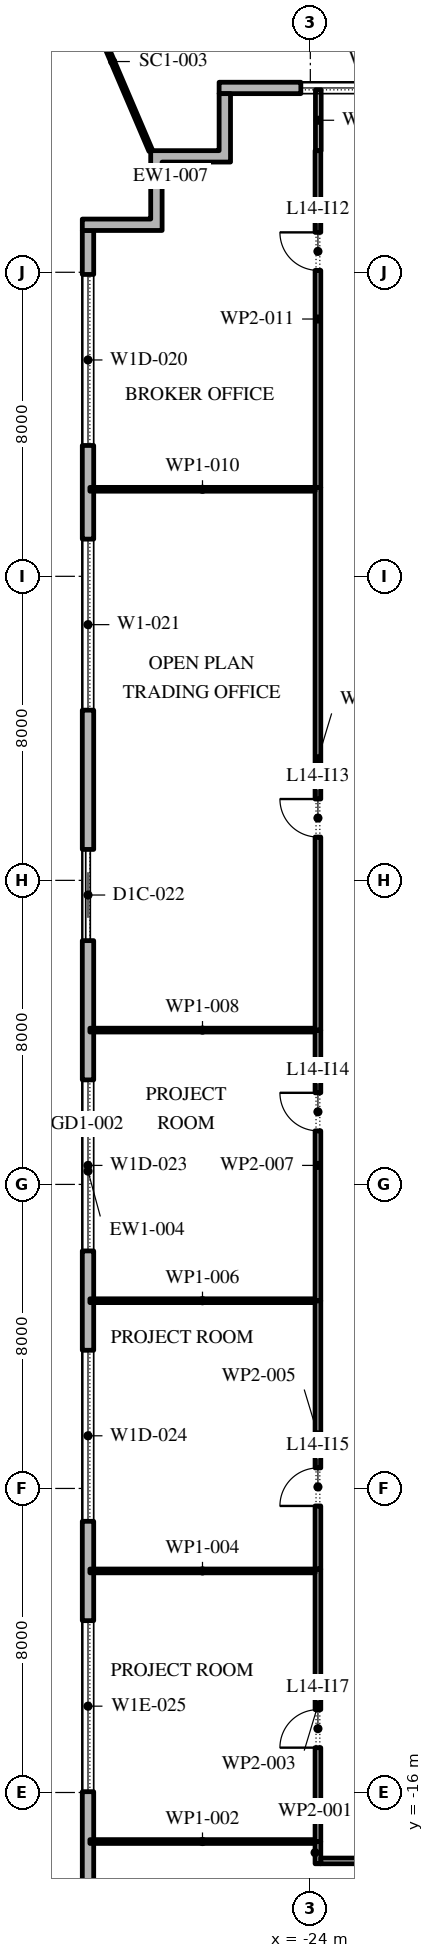
"""IFC4 building model, lengths in metres.
Left out: names, types, materials, properties, quantities, classifications, styles, units other than length and angle.
Written with IfcOpenShell. Run it as: python <this file> out.ifc"""

import sys

from ifc_helpers import new_model, si_unit, direction, frame, frame_2d, origin, place, context, subcontext, project, spatial, polyline, rectangle, outline, extrude, element, fill, save


model = new_model("IFC4")
c1 = context("Model", 3, precision=1e-05, world=origin(), true_north=direction((0.0, 1.0)))
c2 = subcontext(c1, "Body", "Model", "MODEL_VIEW")
j1 = project(units=[si_unit("LENGTHUNIT", "METRE"), si_unit("PLANEANGLEUNIT", "RADIAN")], contexts=[c1])
p1 = place(None, origin())
s1 = spatial("IfcSite", under=j1, at=p1, CompositionType="ELEMENT")
p2 = place(p1, origin())
s2 = spatial("IfcBuilding", under=s1, at=p2, CompositionType="ELEMENT")
p3 = place(p2, frame((0.0, 0.0, 69.0)))
s3 = spatial("IfcBuildingStorey", under=s2, at=p3, CompositionType="ELEMENT", Elevation=69.0)
p4 = place(p3, frame((26.1, 28.85, 0.0), z_axis=(0.0, 0.0, 1.0), x_axis=(-1.0, 0.0, 0.0)))
e1 = element("IfcWall", 1, at=p4, inside=s3, PredefinedType="STANDARD", context=c2, shape_type="SweptSolid", body=[
    extrude(rectangle(XDim=52.5, YDim=0.3, at=frame_2d((26.25, 0.0))), origin(), (0.0, 0.0, 1.0), 4.0),
])
p5 = place(p4, frame((2.0, 0.0, 0.45)))
e2 = element("IfcOpeningElement", 2, at=p5, cuts=e1, PredefinedType="OPENING", context=c2, shape_type="SweptSolid", body=[
    extrude(rectangle(XDim=4.5, YDim=2.95, at=frame_2d((2.25, 1.475))), frame((0.0, 0.16, 0.0), z_axis=(0.0, -1.0, 0.0), x_axis=(1.0, 0.0, 0.0)), (0.0, 0.0, 1.0), 0.32),
])
p6 = place(p4, frame((10.65, 0.0, 0.45)))
e3 = element("IfcOpeningElement", 3, at=p6, cuts=e1, PredefinedType="OPENING", context=c2, shape_type="SweptSolid", body=[
    extrude(rectangle(XDim=4.5, YDim=2.95, at=frame_2d((2.25, 1.475))), frame((0.0, 0.16, 0.0), z_axis=(0.0, -1.0, 0.0), x_axis=(1.0, 0.0, 0.0)), (0.0, 0.0, 1.0), 0.32),
])
p7 = place(p4, frame((20.5, 0.0, 0.0)))
e4 = element("IfcOpeningElement", 4, at=p7, cuts=e1, PredefinedType="OPENING", context=c2, shape_type="SweptSolid", body=[
    extrude(rectangle(XDim=2.4, YDim=3.5, at=frame_2d((1.2, 1.75))), frame((0.0, 0.16, 0.0), z_axis=(0.0, -1.0, 0.0), x_axis=(1.0, 0.0, 0.0)), (0.0, 0.0, 1.0), 0.32),
])
p8 = place(p4, frame((28.25, 0.0, 0.45)))
e5 = element("IfcOpeningElement", 5, at=p8, cuts=e1, PredefinedType="OPENING", context=c2, shape_type="SweptSolid", body=[
    extrude(rectangle(XDim=4.5, YDim=2.95, at=frame_2d((2.25, 1.475))), frame((0.0, 0.16, 0.0), z_axis=(0.0, -1.0, 0.0), x_axis=(1.0, 0.0, 0.0)), (0.0, 0.0, 1.0), 0.32),
])
p9 = place(p4, frame((37.05, 0.0, 0.45)))
e6 = element("IfcOpeningElement", 6, at=p9, cuts=e1, PredefinedType="OPENING", context=c2, shape_type="SweptSolid", body=[
    extrude(rectangle(XDim=4.5, YDim=2.95, at=frame_2d((2.25, 1.475))), frame((0.0, 0.16, 0.0), z_axis=(0.0, -1.0, 0.0), x_axis=(1.0, 0.0, 0.0)), (0.0, 0.0, 1.0), 0.32),
])
p10 = place(p4, frame((45.85, 0.0, 0.45)))
e7 = element("IfcOpeningElement", 7, at=p10, cuts=e1, PredefinedType="OPENING", context=c2, shape_type="SweptSolid", body=[
    extrude(rectangle(XDim=4.5, YDim=2.95, at=frame_2d((2.25, 1.475))), frame((0.0, 0.16, 0.0), z_axis=(0.0, -1.0, 0.0), x_axis=(1.0, 0.0, 0.0)), (0.0, 0.0, 1.0), 0.32),
])
p11 = place(p3, frame((-29.85, 25.1, 0.0), z_axis=(0.0, 0.0, 1.0), x_axis=(0.0, -1.0, 0.0)))
e8 = element("IfcWall", 8, at=p11, inside=s3, PredefinedType="STANDARD", context=c2, shape_type="SweptSolid", body=[
    extrude(rectangle(XDim=49.5, YDim=0.3, at=frame_2d((24.75, 0.0))), origin(), (0.0, 0.0, 1.0), 4.0),
])
p12 = place(p11, frame((1.157, 0.0, 0.45)))
e9 = element("IfcOpeningElement", 9, at=p12, cuts=e8, PredefinedType="OPENING", context=c2, shape_type="SweptSolid", body=[
    extrude(rectangle(XDim=4.5, YDim=2.875, at=frame_2d((2.25, 1.438))), frame((0.0, 0.16, 0.0), z_axis=(0.0, -1.0, 0.0), x_axis=(1.0, 0.0, 0.0)), (0.0, 0.0, 1.0), 0.32),
])
p13 = place(p11, frame((8.121, 0.0, 0.45)))
e10 = element("IfcOpeningElement", 10, at=p13, cuts=e8, PredefinedType="OPENING", context=c2, shape_type="SweptSolid", body=[
    extrude(rectangle(XDim=4.5, YDim=3.05, at=frame_2d((2.25, 1.525))), frame((0.0, 0.16, 0.0), z_axis=(0.0, -1.0, 0.0), x_axis=(1.0, 0.0, 0.0)), (0.0, 0.0, 1.0), 0.32),
])
p14 = place(p11, frame((16.286, 0.0, 0.0)))
e11 = element("IfcOpeningElement", 11, at=p14, cuts=e8, PredefinedType="OPENING", context=c2, shape_type="SweptSolid", body=[
    extrude(rectangle(XDim=2.4, YDim=3.325, at=frame_2d((1.2, 1.663))), frame((0.0, 0.16, 0.0), z_axis=(0.0, -1.0, 0.0), x_axis=(1.0, 0.0, 0.0)), (0.0, 0.0, 1.0), 0.32),
])
p15 = place(p11, frame((22.35, 0.0, 0.45)))
e12 = element("IfcOpeningElement", 12, at=p15, cuts=e8, PredefinedType="OPENING", context=c2, shape_type="SweptSolid", body=[
    extrude(rectangle(XDim=4.5, YDim=2.875, at=frame_2d((2.25, 1.438))), frame((0.0, 0.16, 0.0), z_axis=(0.0, -1.0, 0.0), x_axis=(1.0, 0.0, 0.0)), (0.0, 0.0, 1.0), 0.32),
])
p16 = place(p11, frame((29.464, 0.0, 0.45)))
e13 = element("IfcOpeningElement", 13, at=p16, cuts=e8, PredefinedType="OPENING", context=c2, shape_type="SweptSolid", body=[
    extrude(rectangle(XDim=4.5, YDim=2.875, at=frame_2d((2.25, 1.438))), frame((0.0, 0.16, 0.0), z_axis=(0.0, -1.0, 0.0), x_axis=(1.0, 0.0, 0.0)), (0.0, 0.0, 1.0), 0.32),
])
p17 = place(p11, frame((36.579, 0.0, 0.45)))
e14 = element("IfcOpeningElement", 14, at=p17, cuts=e8, PredefinedType="OPENING", context=c2, shape_type="SweptSolid", body=[
    extrude(rectangle(XDim=4.5, YDim=2.825, at=frame_2d((2.25, 1.413))), frame((0.0, 0.16, 0.0), z_axis=(0.0, -1.0, 0.0), x_axis=(1.0, 0.0, 0.0)), (0.0, 0.0, 1.0), 0.32),
])
p18 = place(p11, frame((44.743, 0.0, 0.0)))
e15 = element("IfcOpeningElement", 15, at=p18, cuts=e8, PredefinedType="OPENING", context=c2, shape_type="SweptSolid", body=[
    extrude(rectangle(XDim=2.4, YDim=3.5, at=frame_2d((1.2, 1.75))), frame((0.0, 0.16, 0.0), z_axis=(0.0, -1.0, 0.0), x_axis=(1.0, 0.0, 0.0)), (0.0, 0.0, 1.0), 0.32),
])
p19 = place(p3, origin())
e16 = element("IfcWall", 16, at=p19, inside=s3, PredefinedType="STANDARD", context=c2, shape_type="SweptSolid", body=[
    extrude(outline(polyline([(-28.2, 25.4), (-28.2, 27.2), (-26.4, 27.2), (-26.4, 28.7), (-26.1, 28.7), (-26.1, 26.9), (-27.9, 26.9), (-27.9, 25.1), (-30.0, 25.1), (-30.0, 25.4), (-28.2, 25.4)])), origin(), (0.0, 0.0, 1.0), 4.0),
])
p20 = place(p3, frame((-28.2, 27.2, -0.05), z_axis=(0.0, 0.0, 1.0), x_axis=(-0.392826940341, 0.919612415609, 0.0)))
e17 = element("IfcWall", 17, at=p20, inside=s3, PredefinedType="STANDARD", context=c2, shape_type="SweptSolid", body=[
    extrude(rectangle(XDim=5.099, YDim=0.1, at=frame_2d((2.55, 0.0))), origin(), (0.0, 0.0, 1.0), 4.05),
])
p21 = place(p3, frame((-23.8, -17.875, 0.0), z_axis=(0.0, 0.0, 1.0), x_axis=(0.0, 1.0, 0.0)))
e18 = element("IfcWall", 18, at=p21, inside=s3, PredefinedType="PARTITIONING", context=c2, shape_type="SweptSolid", body=[
    extrude(rectangle(XDim=0.585, YDim=0.15, at=frame_2d((0.292, 0.0))), origin(), (0.0, 0.0, 1.0), 4.0),
])
p22 = place(p3, frame((-23.875, -17.29, 0.0), z_axis=(0.0, 0.0, 1.0), x_axis=(-1.0, 0.0, 0.0)))
e19 = element("IfcWall", 19, at=p22, inside=s3, PredefinedType="PARTITIONING", context=c2, shape_type="SweptSolid", body=[
    extrude(rectangle(XDim=5.925, YDim=0.1, at=frame_2d((2.962, 0.0))), origin(), (0.0, 0.0, 1.0), 4.0),
])
p23 = place(p3, frame((-23.8, -17.29, 0.0), z_axis=(0.0, 0.0, 1.0), x_axis=(0.0, 1.0, 0.0)))
e20 = element("IfcWall", 20, at=p23, inside=s3, PredefinedType="PARTITIONING", context=c2, shape_type="SweptSolid", body=[
    extrude(rectangle(XDim=7.17, YDim=0.15, at=frame_2d((3.585, 0.0))), origin(), (0.0, 0.0, 1.0), 4.0),
])
p24 = place(p23, frame((2.47, 0.0, 0.0)))
e21 = element("IfcOpeningElement", 21, at=p24, cuts=e20, PredefinedType="OPENING", context=c2, shape_type="SweptSolid", body=[
    extrude(rectangle(XDim=1.0, YDim=2.1, at=frame_2d((0.5, 1.05))), frame((0.0, 0.085, 0.0), z_axis=(0.0, -1.0, 0.0), x_axis=(1.0, 0.0, 0.0)), (0.0, 0.0, 1.0), 0.17),
])
p25 = place(p3, frame((-23.875, -10.17, 0.0), z_axis=(0.0, 0.0, 1.0), x_axis=(-1.0, 0.0, 0.0)))
e22 = element("IfcWall", 22, at=p25, inside=s3, PredefinedType="PARTITIONING", context=c2, shape_type="SweptSolid", body=[
    extrude(rectangle(XDim=5.925, YDim=0.1, at=frame_2d((2.962, 0.0))), origin(), (0.0, 0.0, 1.0), 4.0),
])
p26 = place(p3, frame((-23.8, -10.12, 0.0), z_axis=(0.0, 0.0, 1.0), x_axis=(0.0, 1.0, 0.0)))
e23 = element("IfcWall", 23, at=p26, inside=s3, PredefinedType="PARTITIONING", context=c2, shape_type="SweptSolid", body=[
    extrude(rectangle(XDim=7.06, YDim=0.15, at=frame_2d((3.53, 0.0))), origin(), (0.0, 0.0, 1.0), 4.0),
])
p27 = place(p26, frame((1.66, 0.0, 0.0)))
e24 = element("IfcOpeningElement", 24, at=p27, cuts=e23, PredefinedType="OPENING", context=c2, shape_type="SweptSolid", body=[
    extrude(rectangle(XDim=1.0, YDim=2.1, at=frame_2d((0.5, 1.05))), frame((0.0, 0.085, 0.0), z_axis=(0.0, -1.0, 0.0), x_axis=(1.0, 0.0, 0.0)), (0.0, 0.0, 1.0), 0.17),
])
p28 = place(p3, frame((-23.875, -3.06, 0.0), z_axis=(0.0, 0.0, 1.0), x_axis=(-1.0, 0.0, 0.0)))
e25 = element("IfcWall", 25, at=p28, inside=s3, PredefinedType="PARTITIONING", context=c2, shape_type="SweptSolid", body=[
    extrude(rectangle(XDim=5.925, YDim=0.1, at=frame_2d((2.962, 0.0))), origin(), (0.0, 0.0, 1.0), 4.0),
])
p29 = place(p3, frame((-23.8, -3.06, 0.0), z_axis=(0.0, 0.0, 1.0), x_axis=(0.0, 1.0, 0.0)))
e26 = element("IfcWall", 26, at=p29, inside=s3, PredefinedType="PARTITIONING", context=c2, shape_type="SweptSolid", body=[
    extrude(rectangle(XDim=7.12, YDim=0.15, at=frame_2d((3.56, 0.0))), origin(), (0.0, 0.0, 1.0), 4.0),
])
p30 = place(p29, frame((4.47, 0.0, 0.0)))
e27 = element("IfcOpeningElement", 27, at=p30, cuts=e26, PredefinedType="OPENING", context=c2, shape_type="SweptSolid", body=[
    extrude(rectangle(XDim=1.0, YDim=2.1, at=frame_2d((0.5, 1.05))), frame((0.0, 0.085, 0.0), z_axis=(0.0, -1.0, 0.0), x_axis=(1.0, 0.0, 0.0)), (0.0, 0.0, 1.0), 0.17),
])
p31 = place(p3, frame((-23.875, 4.06, 0.0), z_axis=(0.0, 0.0, 1.0), x_axis=(-1.0, 0.0, 0.0)))
e28 = element("IfcWall", 28, at=p31, inside=s3, PredefinedType="PARTITIONING", context=c2, shape_type="SweptSolid", body=[
    extrude(rectangle(XDim=5.925, YDim=0.1, at=frame_2d((2.962, 0.0))), origin(), (0.0, 0.0, 1.0), 4.0),
])
p32 = place(p3, frame((-23.8, 4.06, 0.0), z_axis=(0.0, 0.0, 1.0), x_axis=(0.0, 1.0, 0.0)))
e29 = element("IfcWall", 29, at=p32, inside=s3, PredefinedType="PARTITIONING", context=c2, shape_type="SweptSolid", body=[
    extrude(rectangle(XDim=14.28, YDim=0.15, at=frame_2d((7.14, 0.0))), origin(), (0.0, 0.0, 1.0), 4.0),
])
p33 = place(p32, frame((5.08, 0.0, 0.0)))
e30 = element("IfcOpeningElement", 30, at=p33, cuts=e29, PredefinedType="OPENING", context=c2, shape_type="SweptSolid", body=[
    extrude(rectangle(XDim=1.0, YDim=2.1, at=frame_2d((0.5, 1.05))), frame((0.0, 0.085, 0.0), z_axis=(0.0, -1.0, 0.0), x_axis=(1.0, 0.0, 0.0)), (0.0, 0.0, 1.0), 0.17),
])
p34 = place(p3, frame((-23.875, 18.29, 0.0), z_axis=(0.0, 0.0, 1.0), x_axis=(-1.0, 0.0, 0.0)))
e31 = element("IfcWall", 31, at=p34, inside=s3, PredefinedType="PARTITIONING", context=c2, shape_type="SweptSolid", body=[
    extrude(rectangle(XDim=5.925, YDim=0.1, at=frame_2d((2.962, 0.0))), origin(), (0.0, 0.0, 1.0), 4.0),
])
p35 = place(p3, frame((-23.8, 18.34, 0.0), z_axis=(0.0, 0.0, 1.0), x_axis=(0.0, 1.0, 0.0)))
e32 = element("IfcWall", 32, at=p35, inside=s3, PredefinedType="PARTITIONING", context=c2, shape_type="SweptSolid", body=[
    extrude(rectangle(XDim=8.86, YDim=0.15, at=frame_2d((4.43, 0.0))), origin(), (0.0, 0.0, 1.0), 4.0),
])
p36 = place(p35, frame((5.71, 0.0, 0.0)))
e33 = element("IfcOpeningElement", 33, at=p36, cuts=e32, PredefinedType="OPENING", context=c2, shape_type="SweptSolid", body=[
    extrude(rectangle(XDim=1.0, YDim=2.1, at=frame_2d((0.5, 1.05))), frame((0.0, 0.085, 0.0), z_axis=(0.0, -1.0, 0.0), x_axis=(1.0, 0.0, 0.0)), (0.0, 0.0, 1.0), 0.17),
])
p37 = place(p3, frame((-23.79, 27.2, 0.0), z_axis=(0.0, 0.0, 1.0), x_axis=(0.0, 1.0, 0.0)))
e34 = element("IfcWall", 34, at=p37, inside=s3, PredefinedType="PARTITIONING", context=c2, shape_type="SweptSolid", body=[
    extrude(rectangle(XDim=1.6, YDim=0.15, at=frame_2d((0.8, 0.0))), origin(), (0.0, 0.0, 1.0), 4.0),
])
p38 = place(p3, frame((-17.65, -17.8, 0.0), z_axis=(0.0, 0.0, 1.0), x_axis=(-1.0, 0.0, 0.0)))
e35 = element("IfcWall", 35, at=p38, inside=s3, PredefinedType="PARTITIONING", context=c2, shape_type="SweptSolid", body=[
    extrude(rectangle(XDim=6.075, YDim=0.15, at=frame_2d((3.038, 0.0))), origin(), (0.0, 0.0, 1.0), 4.0),
])
p39 = place(p38, frame((3.25, 0.0, 0.0)))
e36 = element("IfcOpeningElement", 36, at=p39, cuts=e35, PredefinedType="OPENING", context=c2, shape_type="SweptSolid", body=[
    extrude(rectangle(XDim=1.0, YDim=2.1, at=frame_2d((0.5, 1.05))), frame((0.0, 0.085, 0.0), z_axis=(0.0, -1.0, 0.0), x_axis=(1.0, 0.0, 0.0)), (0.0, 0.0, 1.0), 0.17),
])
p40 = place(p10, origin())
e37 = element("IfcWindow", 37, at=p40, inside=s3, PartitioningType="DOUBLE_PANEL_VERTICAL", PredefinedType="WINDOW", context=c2, shape_type="SweptSolid", body=[
    extrude(rectangle(XDim=4.5, YDim=2.95, at=frame_2d((2.25, 1.475))), frame((0.0, 0.03, 0.0), z_axis=(0.0, -1.0, 0.0), x_axis=(1.0, 0.0, 0.0)), (0.0, 0.0, 1.0), 0.06),
])
fill(e7, e37)
p41 = place(p12, origin())
e38 = element("IfcWindow", 38, at=p41, inside=s3, PartitioningType="DOUBLE_PANEL_VERTICAL", PredefinedType="WINDOW", context=c2, shape_type="SweptSolid", body=[
    extrude(rectangle(XDim=4.5, YDim=2.875, at=frame_2d((2.25, 1.438))), frame((0.0, 0.03, 0.0), z_axis=(0.0, -1.0, 0.0), x_axis=(1.0, 0.0, 0.0)), (0.0, 0.0, 1.0), 0.06),
])
fill(e9, e38)
p42 = place(p13, origin())
e39 = element("IfcWindow", 39, at=p42, inside=s3, PartitioningType="DOUBLE_PANEL_VERTICAL", PredefinedType="WINDOW", context=c2, shape_type="SweptSolid", body=[
    extrude(rectangle(XDim=4.5, YDim=3.05, at=frame_2d((2.25, 1.525))), frame((0.0, 0.03, 0.0), z_axis=(0.0, -1.0, 0.0), x_axis=(1.0, 0.0, 0.0)), (0.0, 0.0, 1.0), 0.06),
])
fill(e10, e39)
p43 = place(p14, origin())
e40 = element("IfcDoor", 40, at=p43, inside=s3, OperationType="DOUBLE_DOOR_SLIDING", PredefinedType="DOOR", context=c2, shape_type="SweptSolid", body=[
    extrude(rectangle(XDim=2.4, YDim=3.325, at=frame_2d((1.2, 1.663))), frame((0.0, 0.025, 0.0), z_axis=(0.0, -1.0, 0.0), x_axis=(1.0, 0.0, 0.0)), (0.0, 0.0, 1.0), 0.05),
])
fill(e11, e40)
p44 = place(p15, origin())
e41 = element("IfcWindow", 41, at=p44, inside=s3, PartitioningType="DOUBLE_PANEL_VERTICAL", PredefinedType="WINDOW", context=c2, shape_type="SweptSolid", body=[
    extrude(rectangle(XDim=4.5, YDim=2.875, at=frame_2d((2.25, 1.438))), frame((0.0, 0.03, 0.0), z_axis=(0.0, -1.0, 0.0), x_axis=(1.0, 0.0, 0.0)), (0.0, 0.0, 1.0), 0.06),
])
fill(e12, e41)
p45 = place(p16, origin())
e42 = element("IfcWindow", 42, at=p45, inside=s3, PartitioningType="DOUBLE_PANEL_VERTICAL", PredefinedType="WINDOW", context=c2, shape_type="SweptSolid", body=[
    extrude(rectangle(XDim=4.5, YDim=2.875, at=frame_2d((2.25, 1.438))), frame((0.0, 0.03, 0.0), z_axis=(0.0, -1.0, 0.0), x_axis=(1.0, 0.0, 0.0)), (0.0, 0.0, 1.0), 0.06),
])
fill(e13, e42)
p46 = place(p17, origin())
e43 = element("IfcWindow", 43, at=p46, inside=s3, PartitioningType="DOUBLE_PANEL_VERTICAL", PredefinedType="WINDOW", context=c2, shape_type="SweptSolid", body=[
    extrude(rectangle(XDim=4.5, YDim=2.825, at=frame_2d((2.25, 1.413))), frame((0.0, 0.03, 0.0), z_axis=(0.0, -1.0, 0.0), x_axis=(1.0, 0.0, 0.0)), (0.0, 0.0, 1.0), 0.06),
])
fill(e14, e43)
p47 = place(p36, origin())
e44 = element("IfcDoor", 44, at=p47, inside=s3, OperationType="SINGLE_SWING_LEFT", PredefinedType="DOOR", context=c2, shape_type="SweptSolid", body=[
    extrude(rectangle(XDim=1.0, YDim=2.1, at=frame_2d((0.5, 1.05))), frame((0.0, 0.025, 0.0), z_axis=(0.0, -1.0, 0.0), x_axis=(1.0, 0.0, 0.0)), (0.0, 0.0, 1.0), 0.05),
])
fill(e33, e44)
p48 = place(p33, origin())
e45 = element("IfcDoor", 45, at=p48, inside=s3, OperationType="SINGLE_SWING_LEFT", PredefinedType="DOOR", context=c2, shape_type="SweptSolid", body=[
    extrude(rectangle(XDim=1.0, YDim=2.1, at=frame_2d((0.5, 1.05))), frame((0.0, 0.025, 0.0), z_axis=(0.0, -1.0, 0.0), x_axis=(1.0, 0.0, 0.0)), (0.0, 0.0, 1.0), 0.05),
])
fill(e30, e45)
p49 = place(p30, origin())
e46 = element("IfcDoor", 46, at=p49, inside=s3, OperationType="SINGLE_SWING_LEFT", PredefinedType="DOOR", context=c2, shape_type="SweptSolid", body=[
    extrude(rectangle(XDim=1.0, YDim=2.1, at=frame_2d((0.5, 1.05))), frame((0.0, 0.025, 0.0), z_axis=(0.0, -1.0, 0.0), x_axis=(1.0, 0.0, 0.0)), (0.0, 0.0, 1.0), 0.05),
])
fill(e27, e46)
p50 = place(p27, origin())
e47 = element("IfcDoor", 47, at=p50, inside=s3, OperationType="SINGLE_SWING_RIGHT", PredefinedType="DOOR", context=c2, shape_type="SweptSolid", body=[
    extrude(rectangle(XDim=1.0, YDim=2.1, at=frame_2d((0.5, 1.05))), frame((0.0, 0.025, 0.0), z_axis=(0.0, -1.0, 0.0), x_axis=(1.0, 0.0, 0.0)), (0.0, 0.0, 1.0), 0.05),
])
fill(e24, e47)
p51 = place(p24, origin())
e48 = element("IfcDoor", 48, at=p51, inside=s3, OperationType="SINGLE_SWING_RIGHT", PredefinedType="DOOR", context=c2, shape_type="SweptSolid", body=[
    extrude(rectangle(XDim=1.0, YDim=2.1, at=frame_2d((0.5, 1.05))), frame((0.0, 0.025, 0.0), z_axis=(0.0, -1.0, 0.0), x_axis=(1.0, 0.0, 0.0)), (0.0, 0.0, 1.0), 0.05),
])
fill(e21, e48)
save(model, sys.argv[1])
